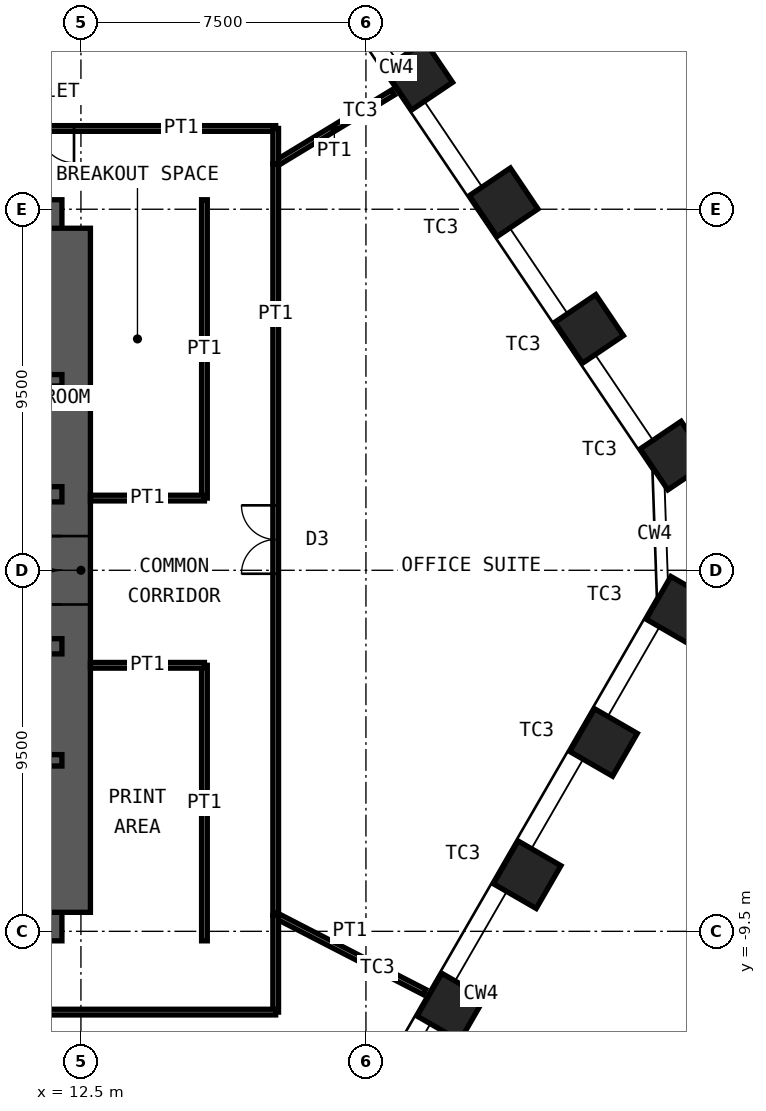
"""IFC4 building model, lengths in metres.
Left out: names, types, materials, properties, quantities, classifications, styles, units other than length and angle.
Written with IfcOpenShell. Run it as: python <this file> out.ifc"""

import sys

from ifc_helpers import new_model, si_unit, direction, frame, frame_2d, origin, origin_2d, place, context, subcontext, project, spatial, rectangle, hollow_rectangle, extrude, element, fill, save


model = new_model("IFC4")
c1 = context("Model", 3, precision=1e-05, world=origin(), true_north=direction((0.0, 1.0)))
c2 = subcontext(c1, "Body", "Model", "MODEL_VIEW")
j1 = project(units=[si_unit("LENGTHUNIT", "METRE"), si_unit("PLANEANGLEUNIT", "RADIAN")], contexts=[c1])
p1 = place(None, origin())
s1 = spatial("IfcSite", under=j1, at=p1, CompositionType="ELEMENT")
p2 = place(p1, origin())
s2 = spatial("IfcBuilding", under=s1, at=p2, CompositionType="ELEMENT")
p3 = place(p2, frame((0.0, 0.0, 136.6)))
s3 = spatial("IfcBuildingStorey", under=s2, at=p3, CompositionType="ELEMENT", Elevation=136.6)
for number, where, z_axis, x_axis in (
    (1, (21.377, 13.014, 0.0), (0.0, 0.0, 1.0), (-0.559, 0.829, 0.0)),
    (2, (23.625, 9.682, 0.0), (0.0, 0.0, 1.0), (-0.559, 0.829, 0.0)),
    (3, (25.872, 6.351, 0.0), (0.0, 0.0, 1.0), (-0.559, 0.829, 0.0)),
    (4, (28.119, 3.019, 0.0), (0.0, 0.0, 1.0), (-0.559, 0.829, 0.0)),
    (5, (28.261, -1.05, 0.0), (0.0, 0.0, 1.0), (0.5, 0.866, 0.0)),
    (6, (26.252, -4.53, 0.0), (0.0, 0.0, 1.0), (0.5, 0.866, 0.0)),
    (7, (24.242, -8.011, 0.0), (0.0, 0.0, 1.0), (0.5, 0.866, 0.0)),
    (8, (22.233, -11.491, 0.0), (0.0, 0.0, 1.0), (0.5, 0.866, 0.0)),
):
    element("IfcColumn", number, at=place(p3, frame(where, z_axis=z_axis, x_axis=x_axis)), inside=s3, PredefinedType="COLUMN", context=c2, shape_type="SweptSolid", body=[
        extrude(hollow_rectangle(XDim=1.3, YDim=1.3, WallThickness=0.1, at=origin_2d()), origin(), (0.0, 0.0, 1.0), 4.2),
    ])
p4 = place(p3, frame((-12.0, 9.0, 0.0), z_axis=(0.0, 0.0, 1.0), x_axis=(1.0, 0.0, 0.0)))
e9 = element("IfcWall", 9, at=p4, inside=s3, PredefinedType="SHEAR", context=c2, shape_type="SweptSolid", body=[
    extrude(rectangle(XDim=24.0, YDim=1.5, at=frame_2d((12.0, 0.0))), origin(), (0.0, 0.0, 1.0), 4.2),
])
p5 = place(p4, frame((10.4, 0.0, 0.0)))
e10 = element("IfcOpeningElement", 10, at=p5, cuts=e9, PredefinedType="OPENING", context=c2, shape_type="SweptSolid", body=[
    extrude(rectangle(XDim=1.0, YDim=2.1, at=frame_2d((0.5, 1.05))), frame((0.0, 0.76, 0.0), z_axis=(0.0, -1.0, 0.0), x_axis=(1.0, 0.0, 0.0)), (0.0, 0.0, 1.0), 1.52),
])
p6 = place(p4, frame((17.6, 0.0, 0.0)))
e11 = element("IfcOpeningElement", 11, at=p6, cuts=e9, PredefinedType="OPENING", context=c2, shape_type="SweptSolid", body=[
    extrude(rectangle(XDim=0.9, YDim=2.1, at=frame_2d((0.45, 1.05))), frame((0.0, 0.76, 0.0), z_axis=(0.0, -1.0, 0.0), x_axis=(1.0, 0.0, 0.0)), (0.0, 0.0, 1.0), 1.52),
])
p7 = place(p4, frame((21.9, 0.0, 0.0)))
e12 = element("IfcOpeningElement", 12, at=p7, cuts=e9, PredefinedType="OPENING", context=c2, shape_type="SweptSolid", body=[
    extrude(rectangle(XDim=0.9, YDim=2.1, at=frame_2d((0.45, 1.05))), frame((0.0, 0.76, 0.0), z_axis=(0.0, -1.0, 0.0), x_axis=(1.0, 0.0, 0.0)), (0.0, 0.0, 1.0), 1.52),
])
p8 = place(p3, frame((-12.0, -9.0, 0.0), z_axis=(0.0, 0.0, 1.0), x_axis=(1.0, 0.0, 0.0)))
e13 = element("IfcWall", 13, at=p8, inside=s3, PredefinedType="SHEAR", context=c2, shape_type="SweptSolid", body=[
    extrude(rectangle(XDim=24.0, YDim=1.5, at=frame_2d((12.0, 0.0))), origin(), (0.0, 0.0, 1.0), 4.2),
])
p9 = place(p8, frame((1.35, 0.0, 0.0)))
e14 = element("IfcOpeningElement", 14, at=p9, cuts=e13, PredefinedType="OPENING", context=c2, shape_type="SweptSolid", body=[
    extrude(rectangle(XDim=1.0, YDim=2.1, at=frame_2d((0.5, 1.05))), frame((0.0, 0.76, 0.0), z_axis=(0.0, -1.0, 0.0), x_axis=(1.0, 0.0, 0.0)), (0.0, 0.0, 1.0), 1.52),
])
p10 = place(p8, frame((5.325, 0.0, 0.0)))
e15 = element("IfcOpeningElement", 15, at=p10, cuts=e13, PredefinedType="OPENING", context=c2, shape_type="SweptSolid", body=[
    extrude(rectangle(XDim=1.15, YDim=2.1, at=frame_2d((0.575, 1.05))), frame((0.0, 0.76, 0.0), z_axis=(0.0, -1.0, 0.0), x_axis=(1.0, 0.0, 0.0)), (0.0, 0.0, 1.0), 1.52),
])
p11 = place(p8, frame((12.6, 0.0, 0.0)))
e16 = element("IfcOpeningElement", 16, at=p11, cuts=e13, PredefinedType="OPENING", context=c2, shape_type="SweptSolid", body=[
    extrude(rectangle(XDim=1.0, YDim=2.1, at=frame_2d((0.5, 1.05))), frame((0.0, 0.76, 0.0), z_axis=(0.0, -1.0, 0.0), x_axis=(1.0, 0.0, 0.0)), (0.0, 0.0, 1.0), 1.52),
])
p12 = place(p3, frame((12.0, -9.0, 0.0), z_axis=(0.0, 0.0, 1.0), x_axis=(0.0, 1.0, 0.0)))
e17 = element("IfcWall", 17, at=p12, inside=s3, PredefinedType="SHEAR", context=c2, shape_type="SweptSolid", body=[
    extrude(rectangle(XDim=18.0, YDim=1.5, at=frame_2d((9.0, 0.0))), origin(), (0.0, 0.0, 1.0), 4.2),
])
p13 = place(p12, frame((8.1, 0.0, 0.0)))
e18 = element("IfcOpeningElement", 18, at=p13, cuts=e17, PredefinedType="OPENING", context=c2, shape_type="SweptSolid", body=[
    extrude(rectangle(XDim=1.8, YDim=2.1, at=frame_2d((0.9, 1.05))), frame((0.0, 0.76, 0.0), z_axis=(0.0, -1.0, 0.0), x_axis=(1.0, 0.0, 0.0)), (0.0, 0.0, 1.0), 1.52),
])
p14 = place(p3, frame((-12.0, 5.0, 0.0), z_axis=(0.0, 0.0, 1.0), x_axis=(1.0, 0.0, 0.0)))
e19 = element("IfcWall", 19, at=p14, inside=s3, PredefinedType="SHEAR", context=c2, shape_type="SweptSolid", body=[
    extrude(rectangle(XDim=24.0, YDim=0.3, at=frame_2d((12.0, 0.0))), origin(), (0.0, 0.0, 1.0), 4.2),
])
p15 = place(p3, frame((-12.0, 2.0, 0.0), z_axis=(0.0, 0.0, 1.0), x_axis=(1.0, 0.0, 0.0)))
e20 = element("IfcWall", 20, at=p15, inside=s3, PredefinedType="SHEAR", context=c2, shape_type="SweptSolid", body=[
    extrude(rectangle(XDim=24.0, YDim=0.4, at=frame_2d((12.0, 0.0))), origin(), (0.0, 0.0, 1.0), 4.2),
])
p16 = place(p15, frame((2.4, 0.0, 0.0)))
e21 = element("IfcOpeningElement", 21, at=p16, cuts=e20, PredefinedType="OPENING", context=c2, shape_type="SweptSolid", body=[
    extrude(rectangle(XDim=1.1, YDim=2.1, at=frame_2d((0.55, 1.05))), frame((0.0, 0.21, 0.0), z_axis=(0.0, -1.0, 0.0), x_axis=(1.0, 0.0, 0.0)), (0.0, 0.0, 1.0), 0.42),
])
p17 = place(p15, frame((22.0, 0.0, 0.0)))
e22 = element("IfcOpeningElement", 22, at=p17, cuts=e20, PredefinedType="OPENING", context=c2, shape_type="SweptSolid", body=[
    extrude(rectangle(XDim=1.1, YDim=2.1, at=frame_2d((0.55, 1.05))), frame((0.0, 0.21, 0.0), z_axis=(0.0, -1.0, 0.0), x_axis=(1.0, 0.0, 0.0)), (0.0, 0.0, 1.0), 0.42),
])
p18 = place(p15, frame((10.15, 0.0, 0.0)))
e23 = element("IfcOpeningElement", 23, at=p18, cuts=e20, PredefinedType="OPENING", context=c2, shape_type="SweptSolid", body=[
    extrude(rectangle(XDim=1.0, YDim=2.1, at=frame_2d((0.5, 1.05))), frame((0.0, 0.21, 0.0), z_axis=(0.0, -1.0, 0.0), x_axis=(1.0, 0.0, 0.0)), (0.0, 0.0, 1.0), 0.42),
])
p19 = place(p15, frame((6.9, 0.0, 0.0)))
e24 = element("IfcOpeningElement", 24, at=p19, cuts=e20, PredefinedType="OPENING", context=c2, shape_type="SweptSolid", body=[
    extrude(rectangle(XDim=1.0, YDim=2.1, at=frame_2d((0.5, 1.05))), frame((0.0, 0.21, 0.0), z_axis=(0.0, -1.0, 0.0), x_axis=(1.0, 0.0, 0.0)), (0.0, 0.0, 1.0), 0.42),
])
p20 = place(p15, frame((13.35, 0.0, 0.0)))
e25 = element("IfcOpeningElement", 25, at=p20, cuts=e20, PredefinedType="OPENING", context=c2, shape_type="SweptSolid", body=[
    extrude(rectangle(XDim=1.1, YDim=2.4, at=frame_2d((0.55, 1.2))), frame((0.0, 0.21, 0.0), z_axis=(0.0, -1.0, 0.0), x_axis=(1.0, 0.0, 0.0)), (0.0, 0.0, 1.0), 0.42),
])
p21 = place(p15, frame((16.15, 0.0, 0.0)))
e26 = element("IfcOpeningElement", 26, at=p21, cuts=e20, PredefinedType="OPENING", context=c2, shape_type="SweptSolid", body=[
    extrude(rectangle(XDim=1.1, YDim=2.4, at=frame_2d((0.55, 1.2))), frame((0.0, 0.21, 0.0), z_axis=(0.0, -1.0, 0.0), x_axis=(1.0, 0.0, 0.0)), (0.0, 0.0, 1.0), 0.42),
])
p22 = place(p15, frame((18.95, 0.0, 0.0)))
e27 = element("IfcOpeningElement", 27, at=p22, cuts=e20, PredefinedType="OPENING", context=c2, shape_type="SweptSolid", body=[
    extrude(rectangle(XDim=1.1, YDim=2.4, at=frame_2d((0.55, 1.2))), frame((0.0, 0.21, 0.0), z_axis=(0.0, -1.0, 0.0), x_axis=(1.0, 0.0, 0.0)), (0.0, 0.0, 1.0), 0.42),
])
p23 = place(p3, frame((-12.0, -2.0, 0.0), z_axis=(0.0, 0.0, 1.0), x_axis=(1.0, 0.0, 0.0)))
e28 = element("IfcWall", 28, at=p23, inside=s3, PredefinedType="SHEAR", context=c2, shape_type="SweptSolid", body=[
    extrude(rectangle(XDim=24.0, YDim=0.4, at=frame_2d((12.0, 0.0))), origin(), (0.0, 0.0, 1.0), 4.2),
])
p24 = place(p23, frame((1.1, 0.0, 0.0)))
e29 = element("IfcOpeningElement", 29, at=p24, cuts=e28, PredefinedType="OPENING", context=c2, shape_type="SweptSolid", body=[
    extrude(rectangle(XDim=1.1, YDim=2.1, at=frame_2d((0.55, 1.05))), frame((0.0, 0.21, 0.0), z_axis=(0.0, -1.0, 0.0), x_axis=(1.0, 0.0, 0.0)), (0.0, 0.0, 1.0), 0.42),
])
p25 = place(p23, frame((13.55, 0.0, 0.0)))
e30 = element("IfcOpeningElement", 30, at=p25, cuts=e28, PredefinedType="OPENING", context=c2, shape_type="SweptSolid", body=[
    extrude(rectangle(XDim=1.1, YDim=2.1, at=frame_2d((0.55, 1.05))), frame((0.0, 0.21, 0.0), z_axis=(0.0, -1.0, 0.0), x_axis=(1.0, 0.0, 0.0)), (0.0, 0.0, 1.0), 0.42),
])
p26 = place(p23, frame((20.7, 0.0, 0.0)))
e31 = element("IfcOpeningElement", 31, at=p26, cuts=e28, PredefinedType="OPENING", context=c2, shape_type="SweptSolid", body=[
    extrude(rectangle(XDim=1.1, YDim=2.1, at=frame_2d((0.55, 1.05))), frame((0.0, 0.21, 0.0), z_axis=(0.0, -1.0, 0.0), x_axis=(1.0, 0.0, 0.0)), (0.0, 0.0, 1.0), 0.42),
])
p27 = place(p23, frame((4.0, 0.0, 0.0)))
e32 = element("IfcOpeningElement", 32, at=p27, cuts=e28, PredefinedType="OPENING", context=c2, shape_type="SweptSolid", body=[
    extrude(rectangle(XDim=1.0, YDim=2.1, at=frame_2d((0.5, 1.05))), frame((0.0, 0.21, 0.0), z_axis=(0.0, -1.0, 0.0), x_axis=(1.0, 0.0, 0.0)), (0.0, 0.0, 1.0), 0.42),
])
p28 = place(p3, frame((-12.0, -5.0, 0.0), z_axis=(0.0, 0.0, 1.0), x_axis=(1.0, 0.0, 0.0)))
e33 = element("IfcWall", 33, at=p28, inside=s3, PredefinedType="SHEAR", context=c2, shape_type="SweptSolid", body=[
    extrude(rectangle(XDim=24.0, YDim=0.3, at=frame_2d((12.0, 0.0))), origin(), (0.0, 0.0, 1.0), 4.2),
])
p29 = place(p3, frame((20.711, 12.571, 0.0), z_axis=(0.0, 0.0, 1.0), x_axis=(-0.854862500505, -0.518854608952, 0.0)))
e34 = element("IfcWall", 34, at=p29, inside=s3, PredefinedType="PARTITIONING", context=c2, shape_type="SweptSolid", body=[
    extrude(rectangle(XDim=3.61, YDim=0.15, at=frame_2d((1.805, 0.0))), origin(), (0.0, 0.0, 1.0), 3.33),
])
p30 = place(p3, frame((17.625, 10.698, 0.0), z_axis=(0.0, 0.0, 1.0), x_axis=(0.0, -1.0, 0.0)))
e35 = element("IfcWall", 35, at=p30, inside=s3, PredefinedType="PARTITIONING", context=c2, shape_type="SweptSolid", body=[
    extrude(rectangle(XDim=19.778, YDim=0.15, at=frame_2d((9.889, 0.0))), origin(), (0.0, 0.0, 1.0), 4.03),
])
p31 = place(p30, frame((8.989, 0.0, 0.0)))
e36 = element("IfcOpeningElement", 36, at=p31, cuts=e35, PredefinedType="OPENING", context=c2, shape_type="SweptSolid", body=[
    extrude(rectangle(XDim=1.8, YDim=2.4, at=frame_2d((0.9, 1.2))), frame((0.0, 0.085, 0.0), z_axis=(0.0, -1.0, 0.0), x_axis=(1.0, 0.0, 0.0)), (0.0, 0.0, 1.0), 0.17),
])
p32 = place(p3, frame((21.538, -11.096, 0.0), z_axis=(0.0, 0.0, 1.0), x_axis=(-0.888982083501, 0.457941977999, 0.0)))
e37 = element("IfcWall", 37, at=p32, inside=s3, PredefinedType="PARTITIONING", context=c2, shape_type="SweptSolid", body=[
    extrude(rectangle(XDim=4.401, YDim=0.15, at=frame_2d((2.201, 0.0))), origin(), (0.0, 0.0, 1.0), 3.33),
])
p33 = place(p3, frame((17.625, -9.08, 0.0), z_axis=(0.0, 0.0, 1.0), x_axis=(0.0, -1.0, 0.0)))
e38 = element("IfcWall", 38, at=p33, inside=s3, PredefinedType="PARTITIONING", context=c2, shape_type="SweptSolid", body=[
    extrude(rectangle(XDim=2.545, YDim=0.15, at=frame_2d((1.272, 0.0))), origin(), (0.0, 0.0, 1.0), 4.03),
])
p34 = place(p3, frame((17.625, -11.625, 0.0), z_axis=(0.0, 0.0, 1.0), x_axis=(-1.0, 0.0, 0.0)))
e39 = element("IfcWall", 39, at=p34, inside=s3, PredefinedType="PARTITIONING", context=c2, shape_type="SweptSolid", body=[
    extrude(rectangle(XDim=17.37, YDim=0.15, at=frame_2d((8.685, 0.0))), origin(), (0.0, 0.0, 1.0), 4.03),
])
p35 = place(p34, frame((7.785, 0.0, 0.0)))
e40 = element("IfcOpeningElement", 40, at=p35, cuts=e39, PredefinedType="OPENING", context=c2, shape_type="SweptSolid", body=[
    extrude(rectangle(XDim=1.8, YDim=2.4, at=frame_2d((0.9, 1.2))), frame((0.0, 0.085, 0.0), z_axis=(0.0, -1.0, 0.0), x_axis=(1.0, 0.0, 0.0)), (0.0, 0.0, 1.0), 0.17),
])
p36 = place(p3, frame((5.211, 11.625, 0.0), z_axis=(0.0, 0.0, 1.0), x_axis=(1.0, 0.0, 0.0)))
e41 = element("IfcWall", 41, at=p36, inside=s3, PredefinedType="PARTITIONING", context=c2, shape_type="SweptSolid", body=[
    extrude(rectangle(XDim=12.414, YDim=0.15, at=frame_2d((6.207, 0.0))), origin(), (0.0, 0.0, 1.0), 4.03),
])
p37 = place(p36, frame((5.307, 0.0, 0.0)))
e42 = element("IfcOpeningElement", 42, at=p37, cuts=e41, PredefinedType="OPENING", context=c2, shape_type="SweptSolid", body=[
    extrude(rectangle(XDim=1.8, YDim=2.4, at=frame_2d((0.9, 1.2))), frame((0.0, 0.085, 0.0), z_axis=(0.0, -1.0, 0.0), x_axis=(1.0, 0.0, 0.0)), (0.0, 0.0, 1.0), 0.17),
])
p38 = place(p3, frame((17.625, 11.625, 0.0), z_axis=(0.0, 0.0, 1.0), x_axis=(0.0, -1.0, 0.0)))
e43 = element("IfcWall", 43, at=p38, inside=s3, PredefinedType="PARTITIONING", context=c2, shape_type="SweptSolid", body=[
    extrude(rectangle(XDim=0.927, YDim=0.15, at=frame_2d((0.464, 0.0))), origin(), (0.0, 0.0, 1.0), 4.03),
])
p39 = place(p3, frame((15.75, 1.9, 0.0), z_axis=(0.0, 0.0, 1.0), x_axis=(0.0, 1.0, 0.0)))
e44 = element("IfcWall", 44, at=p39, inside=s3, PredefinedType="PARTITIONING", context=c2, shape_type="SweptSolid", body=[
    extrude(rectangle(XDim=7.85, YDim=0.15, at=frame_2d((3.925, 0.0))), origin(), (0.0, 0.0, 1.0), 4.03),
])
p40 = place(p3, frame((12.75, 1.9, 0.0), z_axis=(0.0, 0.0, 1.0), x_axis=(1.0, 0.0, 0.0)))
e45 = element("IfcWall", 45, at=p40, inside=s3, PredefinedType="PARTITIONING", context=c2, shape_type="SweptSolid", body=[
    extrude(rectangle(XDim=3.0, YDim=0.15, at=frame_2d((1.5, 0.0))), origin(), (0.0, 0.0, 1.0), 2.93),
])
p41 = place(p3, frame((15.75, -9.75, 0.0), z_axis=(0.0, 0.0, 1.0), x_axis=(0.0, 1.0, 0.0)))
e46 = element("IfcWall", 46, at=p41, inside=s3, PredefinedType="PARTITIONING", context=c2, shape_type="SweptSolid", body=[
    extrude(rectangle(XDim=7.25, YDim=0.15, at=frame_2d((3.625, 0.0))), origin(), (0.0, 0.0, 1.0), 4.03),
])
p42 = place(p3, frame((12.75, -2.5, 0.0), z_axis=(0.0, 0.0, 1.0), x_axis=(1.0, 0.0, 0.0)))
e47 = element("IfcWall", 47, at=p42, inside=s3, PredefinedType="PARTITIONING", context=c2, shape_type="SweptSolid", body=[
    extrude(rectangle(XDim=3.0, YDim=0.15, at=frame_2d((1.5, 0.0))), origin(), (0.0, 0.0, 1.0), 3.33),
])
p43 = place(p13, origin())
e48 = element("IfcDoor", 48, at=p43, inside=s3, OperationType="DOUBLE_DOOR_DOUBLE_SWING", PredefinedType="DOOR", context=c2, shape_type="SweptSolid", body=[
    extrude(rectangle(XDim=1.8, YDim=2.1, at=frame_2d((0.9, 1.05))), frame((0.0, 0.025, 0.0), z_axis=(0.0, -1.0, 0.0), x_axis=(1.0, 0.0, 0.0)), (0.0, 0.0, 1.0), 0.05),
])
fill(e18, e48)
p44 = place(p31, origin())
e49 = element("IfcDoor", 49, at=p44, inside=s3, OperationType="DOUBLE_DOOR_DOUBLE_SWING", PredefinedType="DOOR", context=c2, shape_type="SweptSolid", body=[
    extrude(rectangle(XDim=1.8, YDim=2.4, at=frame_2d((0.9, 1.2))), frame((0.0, 0.025, 0.0), z_axis=(0.0, -1.0, 0.0), x_axis=(1.0, 0.0, 0.0)), (0.0, 0.0, 1.0), 0.05),
])
fill(e36, e49)
p45 = place(p37, origin())
e50 = element("IfcDoor", 50, at=p45, inside=s3, OperationType="DOUBLE_DOOR_DOUBLE_SWING", PredefinedType="DOOR", context=c2, shape_type="SweptSolid", body=[
    extrude(rectangle(XDim=1.8, YDim=2.4, at=frame_2d((0.9, 1.2))), frame((0.0, 0.025, 0.0), z_axis=(0.0, -1.0, 0.0), x_axis=(1.0, 0.0, 0.0)), (0.0, 0.0, 1.0), 0.05),
])
fill(e42, e50)
save(model, sys.argv[1])
